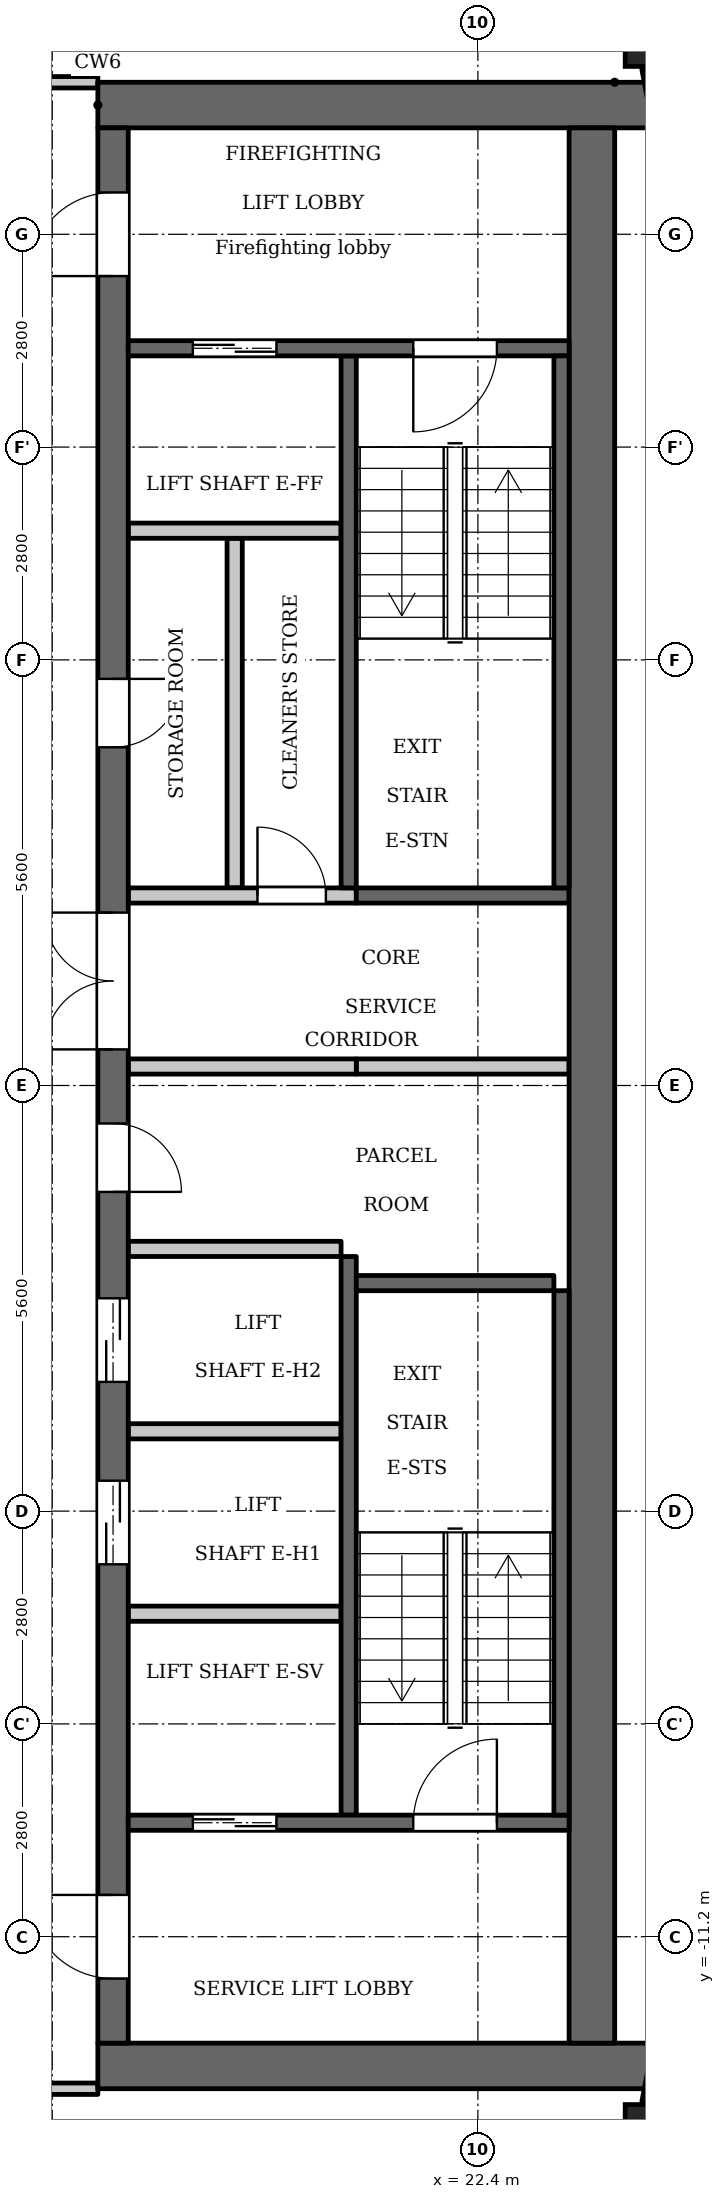
"""IFC4 building model, lengths in metres.
Left out: names, types, materials, properties, quantities, classifications, styles, units other than length and angle.
Written with IfcOpenShell. Run it as: python <this file> out.ifc"""

import sys

from ifc_helpers import new_model, si_unit, direction, frame, frame_2d, origin, origin_2d, place, context, subcontext, project, spatial, rectangle, extrude, element, fill, save


model = new_model("IFC4")
c1 = context("Model", 3, precision=1e-05, world=origin(), true_north=direction((0.0, 1.0)))
c2 = subcontext(c1, "Body", "Model", "MODEL_VIEW")
j1 = project(units=[si_unit("LENGTHUNIT", "METRE"), si_unit("PLANEANGLEUNIT", "RADIAN")], contexts=[c1])
p1 = place(None, origin())
s1 = spatial("IfcSite", under=j1, at=p1, CompositionType="ELEMENT")
p2 = place(p1, origin())
s2 = spatial("IfcBuilding", under=s1, at=p2, CompositionType="ELEMENT")
p3 = place(p2, frame((0.0, 0.0, 248.7)))
s3 = spatial("IfcBuildingStorey", under=s2, at=p3, CompositionType="ELEMENT", Elevation=248.7)
for number, where, z_axis, x_axis in (
    (1, (24.738, -13.809, 0.0), (0.0, 0.0, 1.0), (1.0, 0.0, 0.0)),
    (2, (24.738, 13.809, 0.0), (0.0, 0.0, 1.0), (1.0, 0.0, 0.0)),
):
    element("IfcColumn", number, at=place(p3, frame(where, z_axis=z_axis, x_axis=x_axis)), inside=s3, PredefinedType="COLUMN", context=c2, shape_type="SweptSolid", body=[
        extrude(rectangle(XDim=0.8, YDim=0.8, at=origin_2d()), origin(), (0.0, 0.0, 1.0), 3.5),
    ])
for number, where, z_axis, x_axis in (
    (3, (24.705, -13.395, 0.0), (0.0, 0.0, 1.0), (0.187, 0.982, 0.0)),
    (4, (25.053, 11.572, 0.0), (0.0, 0.0, 1.0), (-0.187, 0.982, 0.0)),
):
    element("IfcWall", number, at=place(p3, frame(where, z_axis=z_axis, x_axis=x_axis)), inside=s3, PredefinedType="SOLIDWALL", context=c2, shape_type="SweptSolid", body=[
        extrude(rectangle(XDim=1.856, YDim=0.3, at=frame_2d((0.928, 0.0))), origin(), (0.0, 0.0, 1.0), 2.55),
    ])
p4 = place(p3, frame((20.7, 2.6, 0.0), z_axis=(0.0, 0.0, 1.0), x_axis=(0.0, 1.0, 0.0)))
e5 = element("IfcWall", 5, at=p4, inside=s3, PredefinedType="SHEAR", context=c2, shape_type="SweptSolid", body=[
    extrude(rectangle(XDim=7.0, YDim=0.2, at=frame_2d((3.5, 0.0))), origin(), (0.0, 0.0, 1.0), 3.2),
])
p5 = place(p3, frame((20.7, -9.6, 0.0), z_axis=(0.0, 0.0, 1.0), x_axis=(0.0, 1.0, 0.0)))
e6 = element("IfcWall", 6, at=p5, inside=s3, PredefinedType="SHEAR", context=c2, shape_type="SweptSolid", body=[
    extrude(rectangle(XDim=7.35, YDim=0.2, at=frame_2d((3.675, 0.0))), origin(), (0.0, 0.0, 1.0), 3.2),
])
p6 = place(p3, frame((20.8, 2.5, 0.0), z_axis=(0.0, 0.0, 1.0), x_axis=(1.0, 0.0, 0.0)))
e7 = element("IfcWall", 7, at=p6, inside=s3, PredefinedType="SHEAR", context=c2, shape_type="SweptSolid", body=[
    extrude(rectangle(XDim=2.8, YDim=0.2, at=frame_2d((1.4, 0.0))), origin(), (0.0, 0.0, 1.0), 3.2),
])
p7 = place(p3, frame((20.8, 0.25, 0.0), z_axis=(0.0, 0.0, 1.0), x_axis=(1.0, 0.0, 0.0)))
e8 = element("IfcWall", 8, at=p7, inside=s3, PredefinedType="PARTITIONING", context=c2, shape_type="SweptSolid", body=[
    extrude(rectangle(XDim=2.8, YDim=0.2, at=frame_2d((1.4, 0.0))), origin(), (0.0, 0.0, 1.0), 3.2),
])
for number, where, z_axis, x_axis in (
    (9, (17.4, 12.9, 0.0), (0.0, 0.0, 1.0), (1.0, 0.0, 0.0)),
    (10, (17.4, -12.9, 0.0), (0.0, 0.0, 1.0), (1.0, 0.0, 0.0)),
):
    element("IfcWall", number, at=place(p3, frame(where, z_axis=z_axis, x_axis=x_axis)), inside=s3, PredefinedType="SHEAR", context=c2, shape_type="SweptSolid", body=[
        extrude(rectangle(XDim=7.32, YDim=0.6, at=frame_2d((3.66, 0.0))), origin(), (0.0, 0.0, 1.0), 3.2),
    ])
p8 = place(p3, frame((19.2, 2.6, 0.0), z_axis=(0.0, 0.0, 1.0), x_axis=(0.0, 1.0, 0.0)))
e11 = element("IfcWall", 11, at=p8, inside=s3, PredefinedType="PARTITIONING", context=c2, shape_type="SweptSolid", body=[
    extrude(rectangle(XDim=4.6, YDim=0.2, at=frame_2d((2.3, 0.0))), origin(), (0.0, 0.0, 1.0), 3.2),
])
p9 = place(p3, frame((17.6, -12.6, 0.0), z_axis=(0.0, 0.0, 1.0), x_axis=(0.0, 1.0, 0.0)))
e12 = element("IfcWall", 12, at=p9, inside=s3, PredefinedType="SHEAR", context=c2, shape_type="SweptSolid", body=[
    extrude(rectangle(XDim=25.2, YDim=0.4, at=frame_2d((12.6, 0.0))), origin(), (0.0, 0.0, 1.0), 3.2),
])
p10 = place(p9, frame((6.3, 0.0, 0.0)))
e13 = element("IfcOpeningElement", 13, at=p10, cuts=e12, PredefinedType="OPENING", context=c2, shape_type="SweptSolid", body=[
    extrude(rectangle(XDim=1.1, YDim=2.1, at=frame_2d((0.55, 1.05))), frame((0.0, 0.21, 0.0), z_axis=(0.0, -1.0, 0.0), x_axis=(1.0, 0.0, 0.0)), (0.0, 0.0, 1.0), 0.42),
])
p11 = place(p9, frame((8.7, 0.0, 0.0)))
e14 = element("IfcOpeningElement", 14, at=p11, cuts=e12, PredefinedType="OPENING", context=c2, shape_type="SweptSolid", body=[
    extrude(rectangle(XDim=1.1, YDim=2.1, at=frame_2d((0.55, 1.05))), frame((0.0, 0.21, 0.0), z_axis=(0.0, -1.0, 0.0), x_axis=(1.0, 0.0, 0.0)), (0.0, 0.0, 1.0), 0.42),
])
p12 = place(p9, frame((11.2, 0.0, 0.0)))
e15 = element("IfcOpeningElement", 15, at=p12, cuts=e12, PredefinedType="OPENING", context=c2, shape_type="SweptSolid", body=[
    extrude(rectangle(XDim=0.9, YDim=2.1, at=frame_2d((0.45, 1.05))), frame((0.0, 0.21, 0.0), z_axis=(0.0, -1.0, 0.0), x_axis=(1.0, 0.0, 0.0)), (0.0, 0.0, 1.0), 0.42),
])
p13 = place(p9, frame((17.05, 0.0, 0.0)))
e16 = element("IfcOpeningElement", 16, at=p13, cuts=e12, PredefinedType="OPENING", context=c2, shape_type="SweptSolid", body=[
    extrude(rectangle(XDim=0.9, YDim=2.1, at=frame_2d((0.45, 1.05))), frame((0.0, 0.21, 0.0), z_axis=(0.0, -1.0, 0.0), x_axis=(1.0, 0.0, 0.0)), (0.0, 0.0, 1.0), 0.42),
])
p14 = place(p9, frame((23.25, 0.0, 0.0)))
e17 = element("IfcOpeningElement", 17, at=p14, cuts=e12, PredefinedType="OPENING", context=c2, shape_type="SweptSolid", body=[
    extrude(rectangle(XDim=1.1, YDim=2.1, at=frame_2d((0.55, 1.05))), frame((0.0, 0.21, 0.0), z_axis=(0.0, -1.0, 0.0), x_axis=(1.0, 0.0, 0.0)), (0.0, 0.0, 1.0), 0.42),
])
p15 = place(p9, frame((0.85, 0.0, 0.0)))
e18 = element("IfcOpeningElement", 18, at=p15, cuts=e12, PredefinedType="OPENING", context=c2, shape_type="SweptSolid", body=[
    extrude(rectangle(XDim=1.1, YDim=2.1, at=frame_2d((0.55, 1.05))), frame((0.0, 0.21, 0.0), z_axis=(0.0, -1.0, 0.0), x_axis=(1.0, 0.0, 0.0)), (0.0, 0.0, 1.0), 0.42),
])
p16 = place(p9, frame((13.075, 0.0, 0.0)))
e19 = element("IfcOpeningElement", 19, at=p16, cuts=e12, PredefinedType="OPENING", context=c2, shape_type="SweptSolid", body=[
    extrude(rectangle(XDim=1.8, YDim=2.1, at=frame_2d((0.9, 1.05))), frame((0.0, 0.21, 0.0), z_axis=(0.0, -1.0, 0.0), x_axis=(1.0, 0.0, 0.0)), (0.0, 0.0, 1.0), 0.42),
])
p17 = place(p3, frame((23.9, -12.6, 0.0), z_axis=(0.0, 0.0, 1.0), x_axis=(0.0, 1.0, 0.0)))
e20 = element("IfcWall", 20, at=p17, inside=s3, PredefinedType="SHEAR", context=c2, shape_type="SweptSolid", body=[
    extrude(rectangle(XDim=25.2, YDim=0.6, at=frame_2d((12.6, 0.0))), origin(), (0.0, 0.0, 1.0), 3.2),
])
p18 = place(p3, frame((17.8, -9.7, 0.0), z_axis=(0.0, 0.0, 1.0), x_axis=(1.0, 0.0, 0.0)))
e21 = element("IfcWall", 21, at=p18, inside=s3, PredefinedType="SHEAR", context=c2, shape_type="SweptSolid", body=[
    extrude(rectangle(XDim=5.8, YDim=0.2, at=frame_2d((2.9, 0.0))), origin(), (0.0, 0.0, 1.0), 3.2),
])
p19 = place(p18, frame((0.85, 0.0, 0.0)))
e22 = element("IfcOpeningElement", 22, at=p19, cuts=e21, PredefinedType="OPENING", context=c2, shape_type="SweptSolid", body=[
    extrude(rectangle(XDim=1.1, YDim=2.1, at=frame_2d((0.55, 1.05))), frame((0.0, 0.11, 0.0), z_axis=(0.0, -1.0, 0.0), x_axis=(1.0, 0.0, 0.0)), (0.0, 0.0, 1.0), 0.22),
])
p20 = place(p18, frame((3.75, 0.0, 0.0)))
e23 = element("IfcOpeningElement", 23, at=p20, cuts=e21, PredefinedType="OPENING", context=c2, shape_type="SweptSolid", body=[
    extrude(rectangle(XDim=1.1, YDim=2.1, at=frame_2d((0.55, 1.05))), frame((0.0, 0.11, 0.0), z_axis=(0.0, -1.0, 0.0), x_axis=(1.0, 0.0, 0.0)), (0.0, 0.0, 1.0), 0.22),
])
for number, where, z_axis, x_axis in (
    (24, (17.8, -6.95, 0.0), (0.0, 0.0, 1.0), (1.0, 0.0, 0.0)),
    (25, (17.8, -4.55, 0.0), (0.0, 0.0, 1.0), (1.0, 0.0, 0.0)),
    (26, (17.8, -2.15, 0.0), (0.0, 0.0, 1.0), (1.0, 0.0, 0.0)),
):
    element("IfcWall", number, at=place(p3, frame(where, z_axis=z_axis, x_axis=x_axis)), inside=s3, PredefinedType="PARTITIONING", context=c2, shape_type="SweptSolid", body=[
        extrude(rectangle(XDim=2.8, YDim=0.2, at=frame_2d((1.4, 0.0))), origin(), (0.0, 0.0, 1.0), 3.2),
    ])
p21 = place(p3, frame((17.8, 0.25, 0.0), z_axis=(0.0, 0.0, 1.0), x_axis=(1.0, 0.0, 0.0)))
e27 = element("IfcWall", 27, at=p21, inside=s3, PredefinedType="PARTITIONING", context=c2, shape_type="SweptSolid", body=[
    extrude(rectangle(XDim=3.0, YDim=0.2, at=frame_2d((1.5, 0.0))), origin(), (0.0, 0.0, 1.0), 3.2),
])
p22 = place(p3, frame((17.8, 2.5, 0.0), z_axis=(0.0, 0.0, 1.0), x_axis=(1.0, 0.0, 0.0)))
e28 = element("IfcWall", 28, at=p22, inside=s3, PredefinedType="PARTITIONING", context=c2, shape_type="SweptSolid", body=[
    extrude(rectangle(XDim=3.0, YDim=0.2, at=frame_2d((1.5, 0.0))), origin(), (0.0, 0.0, 1.0), 3.2),
])
p23 = place(p22, frame((1.7, 0.0, 0.0)))
e29 = element("IfcOpeningElement", 29, at=p23, cuts=e28, PredefinedType="OPENING", context=c2, shape_type="SweptSolid", body=[
    extrude(rectangle(XDim=0.9, YDim=2.1, at=frame_2d((0.45, 1.05))), frame((0.0, 0.11, 0.0), z_axis=(0.0, -1.0, 0.0), x_axis=(1.0, 0.0, 0.0)), (0.0, 0.0, 1.0), 0.22),
])
p24 = place(p3, frame((17.8, 7.3, 0.0), z_axis=(0.0, 0.0, 1.0), x_axis=(1.0, 0.0, 0.0)))
e30 = element("IfcWall", 30, at=p24, inside=s3, PredefinedType="PARTITIONING", context=c2, shape_type="SweptSolid", body=[
    extrude(rectangle(XDim=2.8, YDim=0.2, at=frame_2d((1.4, 0.0))), origin(), (0.0, 0.0, 1.0), 3.2),
])
p25 = place(p3, frame((17.8, 9.7, 0.0), z_axis=(0.0, 0.0, 1.0), x_axis=(1.0, 0.0, 0.0)))
e31 = element("IfcWall", 31, at=p25, inside=s3, PredefinedType="SHEAR", context=c2, shape_type="SweptSolid", body=[
    extrude(rectangle(XDim=5.8, YDim=0.2, at=frame_2d((2.9, 0.0))), origin(), (0.0, 0.0, 1.0), 3.2),
])
p26 = place(p25, frame((0.85, 0.0, 0.0)))
e32 = element("IfcOpeningElement", 32, at=p26, cuts=e31, PredefinedType="OPENING", context=c2, shape_type="SweptSolid", body=[
    extrude(rectangle(XDim=1.1, YDim=2.1, at=frame_2d((0.55, 1.05))), frame((0.0, 0.11, 0.0), z_axis=(0.0, -1.0, 0.0), x_axis=(1.0, 0.0, 0.0)), (0.0, 0.0, 1.0), 0.22),
])
p27 = place(p25, frame((3.75, 0.0, 0.0)))
e33 = element("IfcOpeningElement", 33, at=p27, cuts=e31, PredefinedType="OPENING", context=c2, shape_type="SweptSolid", body=[
    extrude(rectangle(XDim=1.1, YDim=2.1, at=frame_2d((0.55, 1.05))), frame((0.0, 0.11, 0.0), z_axis=(0.0, -1.0, 0.0), x_axis=(1.0, 0.0, 0.0)), (0.0, 0.0, 1.0), 0.22),
])
p28 = place(p3, frame((23.5, 2.6, 0.0), z_axis=(0.0, 0.0, 1.0), x_axis=(0.0, 1.0, 0.0)))
e34 = element("IfcWall", 34, at=p28, inside=s3, PredefinedType="SHEAR", context=c2, shape_type="SweptSolid", body=[
    extrude(rectangle(XDim=7.0, YDim=0.2, at=frame_2d((3.5, 0.0))), origin(), (0.0, 0.0, 1.0), 3.2),
])
p29 = place(p3, frame((23.5, -9.6, 0.0), z_axis=(0.0, 0.0, 1.0), x_axis=(0.0, 1.0, 0.0)))
e35 = element("IfcWall", 35, at=p29, inside=s3, PredefinedType="SHEAR", context=c2, shape_type="SweptSolid", body=[
    extrude(rectangle(XDim=6.9, YDim=0.2, at=frame_2d((3.45, 0.0))), origin(), (0.0, 0.0, 1.0), 3.2),
])
p30 = place(p3, frame((20.8, -2.6, 0.0), z_axis=(0.0, 0.0, 1.0), x_axis=(1.0, 0.0, 0.0)))
e36 = element("IfcWall", 36, at=p30, inside=s3, PredefinedType="SHEAR", context=c2, shape_type="SweptSolid", body=[
    extrude(rectangle(XDim=2.6, YDim=0.2, at=frame_2d((1.3, 0.0))), origin(), (0.0, 0.0, 1.0), 3.2),
])
p31 = place(p3, frame((15.075, -13.2, 0.0), z_axis=(0.0, 0.0, 1.0), x_axis=(1.0, 0.0, 0.0)))
e37 = element("IfcWall", 37, at=p31, inside=s3, PredefinedType="PARTITIONING", context=c2, shape_type="SweptSolid", body=[
    extrude(rectangle(XDim=2.325, YDim=0.15, at=frame_2d((1.163, 0.0))), origin(), (0.0, 0.0, 1.0), 3.2),
])
p32 = place(p31, frame((0.575, 0.0, 0.0)))
e38 = element("IfcOpeningElement", 38, at=p32, cuts=e37, PredefinedType="OPENING", context=c2, shape_type="SweptSolid", body=[
    extrude(rectangle(XDim=1.0, YDim=2.1, at=frame_2d((0.5, 1.05))), frame((0.0, 0.085, 0.0), z_axis=(0.0, -1.0, 0.0), x_axis=(1.0, 0.0, 0.0)), (0.0, 0.0, 1.0), 0.17),
])
p33 = place(p3, frame((15.075, 13.2, 0.0), z_axis=(0.0, 0.0, 1.0), x_axis=(1.0, 0.0, 0.0)))
e39 = element("IfcWall", 39, at=p33, inside=s3, PredefinedType="PARTITIONING", context=c2, shape_type="SweptSolid", body=[
    extrude(rectangle(XDim=2.325, YDim=0.15, at=frame_2d((1.163, 0.0))), origin(), (0.0, 0.0, 1.0), 3.2),
])
p34 = place(p33, frame((0.675, 0.0, 0.0)))
e40 = element("IfcOpeningElement", 40, at=p34, cuts=e39, PredefinedType="OPENING", context=c2, shape_type="SweptSolid", body=[
    extrude(rectangle(XDim=1.0, YDim=2.1, at=frame_2d((0.5, 1.05))), frame((0.0, 0.085, 0.0), z_axis=(0.0, -1.0, 0.0), x_axis=(1.0, 0.0, 0.0)), (0.0, 0.0, 1.0), 0.17),
])
p35 = place(p19, origin())
e41 = element("IfcDoor", 41, at=p35, inside=s3, OperationType="DOUBLE_DOOR_SLIDING", PredefinedType="DOOR", context=c2, shape_type="SweptSolid", body=[
    extrude(rectangle(XDim=1.1, YDim=2.1, at=frame_2d((0.55, 1.05))), frame((0.0, 0.025, 0.0), z_axis=(0.0, -1.0, 0.0), x_axis=(1.0, 0.0, 0.0)), (0.0, 0.0, 1.0), 0.05),
])
fill(e22, e41)
p36 = place(p10, origin())
e42 = element("IfcDoor", 42, at=p36, inside=s3, OperationType="DOUBLE_DOOR_SLIDING", PredefinedType="DOOR", context=c2, shape_type="SweptSolid", body=[
    extrude(rectangle(XDim=1.1, YDim=2.1, at=frame_2d((0.55, 1.05))), frame((0.0, 0.025, 0.0), z_axis=(0.0, -1.0, 0.0), x_axis=(1.0, 0.0, 0.0)), (0.0, 0.0, 1.0), 0.05),
])
fill(e13, e42)
p37 = place(p11, origin())
e43 = element("IfcDoor", 43, at=p37, inside=s3, OperationType="DOUBLE_DOOR_SLIDING", PredefinedType="DOOR", context=c2, shape_type="SweptSolid", body=[
    extrude(rectangle(XDim=1.1, YDim=2.1, at=frame_2d((0.55, 1.05))), frame((0.0, 0.025, 0.0), z_axis=(0.0, -1.0, 0.0), x_axis=(1.0, 0.0, 0.0)), (0.0, 0.0, 1.0), 0.05),
])
fill(e14, e43)
p38 = place(p12, origin())
e44 = element("IfcDoor", 44, at=p38, inside=s3, OperationType="SINGLE_SWING_LEFT", PredefinedType="DOOR", context=c2, shape_type="SweptSolid", body=[
    extrude(rectangle(XDim=0.9, YDim=2.1, at=frame_2d((0.45, 1.05))), frame((0.0, 0.025, 0.0), z_axis=(0.0, -1.0, 0.0), x_axis=(1.0, 0.0, 0.0)), (0.0, 0.0, 1.0), 0.05),
])
fill(e15, e44)
p39 = place(p13, origin())
e45 = element("IfcDoor", 45, at=p39, inside=s3, OperationType="SINGLE_SWING_RIGHT", PredefinedType="DOOR", context=c2, shape_type="SweptSolid", body=[
    extrude(rectangle(XDim=0.9, YDim=2.1, at=frame_2d((0.45, 1.05))), frame((0.0, 0.025, 0.0), z_axis=(0.0, -1.0, 0.0), x_axis=(1.0, 0.0, 0.0)), (0.0, 0.0, 1.0), 0.05),
])
fill(e16, e45)
p40 = place(p23, origin())
e46 = element("IfcDoor", 46, at=p40, inside=s3, OperationType="SINGLE_SWING_RIGHT", PredefinedType="DOOR", context=c2, shape_type="SweptSolid", body=[
    extrude(rectangle(XDim=0.9, YDim=2.1, at=frame_2d((0.45, 1.05))), frame((0.0, 0.025, 0.0), z_axis=(0.0, -1.0, 0.0), x_axis=(1.0, 0.0, 0.0)), (0.0, 0.0, 1.0), 0.05),
])
fill(e29, e46)
p41 = place(p26, origin())
e47 = element("IfcDoor", 47, at=p41, inside=s3, OperationType="DOUBLE_DOOR_SLIDING", PredefinedType="DOOR", context=c2, shape_type="SweptSolid", body=[
    extrude(rectangle(XDim=1.1, YDim=2.1, at=frame_2d((0.55, 1.05))), frame((0.0, 0.025, 0.0), z_axis=(0.0, -1.0, 0.0), x_axis=(1.0, 0.0, 0.0)), (0.0, 0.0, 1.0), 0.05),
])
fill(e32, e47)
p42 = place(p14, origin())
e48 = element("IfcDoor", 48, at=p42, inside=s3, OperationType="SINGLE_SWING_RIGHT", PredefinedType="DOOR", context=c2, shape_type="SweptSolid", body=[
    extrude(rectangle(XDim=1.1, YDim=2.1, at=frame_2d((0.55, 1.05))), frame((0.0, 0.025, 0.0), z_axis=(0.0, -1.0, 0.0), x_axis=(1.0, 0.0, 0.0)), (0.0, 0.0, 1.0), 0.05),
])
fill(e17, e48)
p43 = place(p15, origin())
e49 = element("IfcDoor", 49, at=p43, inside=s3, OperationType="SINGLE_SWING_LEFT", PredefinedType="DOOR", context=c2, shape_type="SweptSolid", body=[
    extrude(rectangle(XDim=1.1, YDim=2.1, at=frame_2d((0.55, 1.05))), frame((0.0, 0.025, 0.0), z_axis=(0.0, -1.0, 0.0), x_axis=(1.0, 0.0, 0.0)), (0.0, 0.0, 1.0), 0.05),
])
fill(e18, e49)
p44 = place(p27, origin())
e50 = element("IfcDoor", 50, at=p44, inside=s3, OperationType="SINGLE_SWING_LEFT", PredefinedType="DOOR", context=c2, shape_type="SweptSolid", body=[
    extrude(rectangle(XDim=1.1, YDim=2.1, at=frame_2d((0.55, 1.05))), frame((0.0, 0.025, 0.0), z_axis=(0.0, -1.0, 0.0), x_axis=(1.0, 0.0, 0.0)), (0.0, 0.0, 1.0), 0.05),
])
fill(e33, e50)
p45 = place(p20, origin())
e51 = element("IfcDoor", 51, at=p45, inside=s3, OperationType="SINGLE_SWING_LEFT", PredefinedType="DOOR", context=c2, shape_type="SweptSolid", body=[
    extrude(rectangle(XDim=1.1, YDim=2.1, at=frame_2d((0.55, 1.05))), frame((0.0, 0.025, 0.0), z_axis=(0.0, -1.0, 0.0), x_axis=(1.0, 0.0, 0.0)), (0.0, 0.0, 1.0), 0.05),
])
fill(e23, e51)
p46 = place(p16, origin())
e52 = element("IfcDoor", 52, at=p46, inside=s3, OperationType="DOUBLE_DOOR_SINGLE_SWING", PredefinedType="DOOR", context=c2, shape_type="SweptSolid", body=[
    extrude(rectangle(XDim=1.8, YDim=2.1, at=frame_2d((0.9, 1.05))), frame((0.0, 0.025, 0.0), z_axis=(0.0, -1.0, 0.0), x_axis=(1.0, 0.0, 0.0)), (0.0, 0.0, 1.0), 0.05),
])
fill(e19, e52)
save(model, sys.argv[1])
